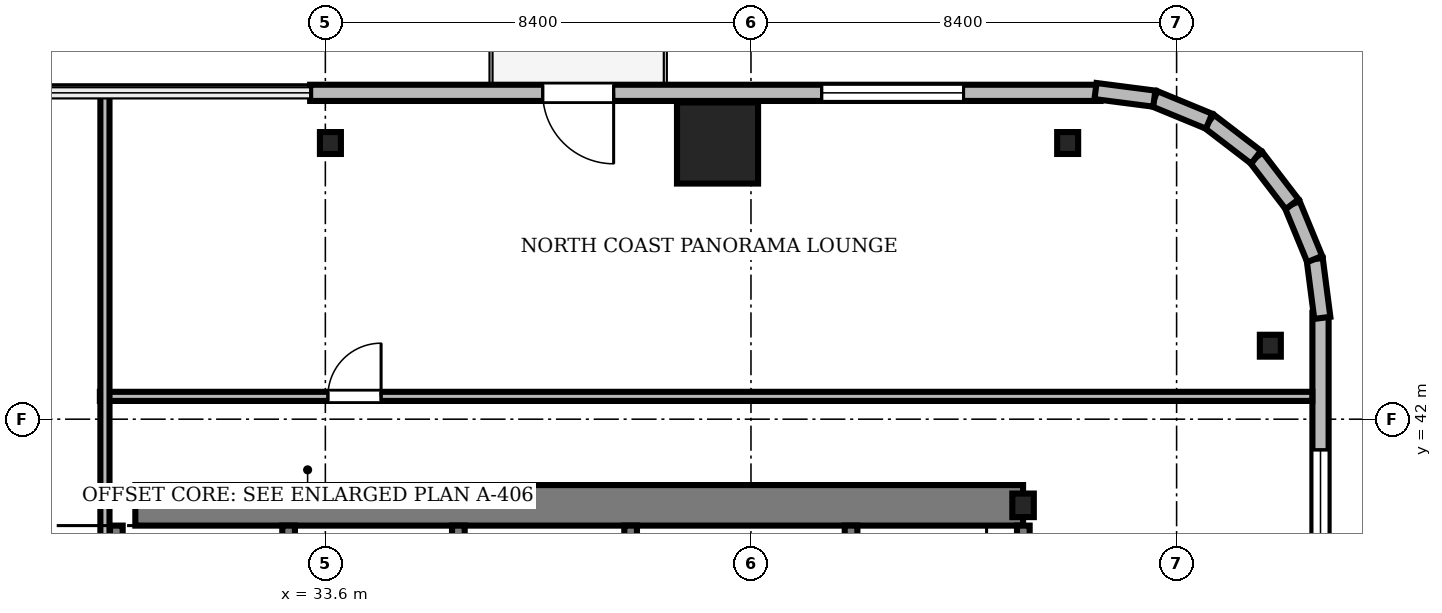
"""IFC4 building model, lengths in metres.
Left out: names, types, materials, properties, quantities, classifications, styles, units other than length and angle.
Written with IfcOpenShell. Run it as: python <this file> out.ifc"""

import sys

from ifc_helpers import new_model, si_unit, direction, frame, frame_2d, origin, origin_2d, place, context, subcontext, project, spatial, rectangle, i_section, extrude, source, transform, mapped, element, fill, save


model = new_model("IFC4")
c1 = context("Model", 3, precision=1e-05, world=origin(), true_north=direction((0.0, 1.0)))
c2 = subcontext(c1, "Body", "Model", "MODEL_VIEW")
j1 = project(units=[si_unit("LENGTHUNIT", "METRE"), si_unit("PLANEANGLEUNIT", "RADIAN")], contexts=[c1])
p1 = place(None, origin())
s1 = spatial("IfcSite", under=j1, at=p1, CompositionType="ELEMENT")
p2 = place(p1, origin())
s2 = spatial("IfcBuilding", under=s1, at=p2, CompositionType="ELEMENT")
p3 = place(p2, frame((0.0, 0.0, 133.5)))
s3 = spatial("IfcBuildingStorey", under=s2, at=p3, CompositionType="ELEMENT", Elevation=133.5)
m1 = source(origin(), c2, "Body", "SweptSolid", [
    extrude(rectangle(XDim=17.52, YDim=0.8, at=frame_2d((8.76, 0.0))), origin(), (0.0, 0.0, 1.0), 3.46),
])
p4 = place(p3, frame((29.85, 40.3, 0.0), z_axis=(0.0, 0.0, 1.0), x_axis=(1.0, 0.0, 0.0)))
e1 = element("IfcWall", 1, at=p4, inside=s3, PredefinedType="SHEAR", context=c2, shape_type="MappedRepresentation", body=[
    mapped(m1, transform((0.0, 0.0, 0.0), scale=1.0)),
])
m2 = source(origin(), c2, "Body", "SweptSolid", [
    extrude(i_section(OverallWidth=0.424, OverallDepth=0.465, WebThickness=0.035, FlangeThickness=0.056, FilletRadius=0.015, at=origin_2d()), origin(), (0.0, 0.0, 1.0), 3.46),
])
p5 = place(p3, frame((47.37, 40.3, 0.0), z_axis=(0.0, 0.0, 1.0), x_axis=(1.0, 0.0, 0.0)))
e2 = element("IfcColumn", 2, at=p5, inside=s3, PredefinedType="COLUMN", context=c2, shape_type="MappedRepresentation", body=[
    mapped(m2, transform((0.0, 0.0, 0.0), scale=1.0)),
])
m3 = source(origin(), c2, "Body", "SweptSolid", [
    extrude(rectangle(XDim=1.6, YDim=1.6, at=origin_2d()), origin(), (0.0, 0.0, 1.0), 3.46),
])
p6 = place(p3, frame((41.34, 47.45, 0.0), z_axis=(0.0, 0.0, 1.0), x_axis=(1.0, 0.0, 0.0)))
e3 = element("IfcColumn", 3, at=p6, inside=s3, PredefinedType="COLUMN", context=c2, shape_type="MappedRepresentation", body=[
    mapped(m3, transform((0.0, 0.0, 0.0), scale=1.0)),
])
m4 = source(origin(), c2, "Body", "SweptSolid", [
    extrude(i_section(OverallWidth=0.414, OverallDepth=0.432, WebThickness=0.026, FlangeThickness=0.04, FilletRadius=0.015, at=origin_2d()), origin(), (0.0, 0.0, 1.0), 3.46),
])
for number, where, z_axis, x_axis in (
    (4, (52.25, 43.45, 0.0), (0.0, 0.0, 1.0), (1.0, 0.0, 0.0)),
    (5, (48.25, 47.45, 0.0), (0.0, 0.0, 1.0), (1.0, 0.0, 0.0)),
    (6, (33.7, 47.45, 0.0), (0.0, 0.0, 1.0), (1.0, 0.0, 0.0)),
):
    element("IfcColumn", number, at=place(p3, frame(where, z_axis=z_axis, x_axis=x_axis)), inside=s3, PredefinedType="COLUMN", context=c2, shape_type="MappedRepresentation", body=[
        mapped(m4, transform((0.0, 0.0, 0.0), scale=1.0)),
    ])
m5 = source(origin(), c2, "Body", "SweptSolid", [
    extrude(rectangle(XDim=15.6, YDim=0.32, at=frame_2d((7.8, 0.0))), origin(), (0.0, 0.0, 1.0), 3.46),
])
p7 = place(p3, frame((48.9, 48.44, 0.0), z_axis=(0.0, 0.0, 1.0), x_axis=(-1.0, 0.0, 0.0)))
e7 = element("IfcWall", 7, at=p7, inside=s3, PredefinedType="SOLIDWALL", context=c2, shape_type="MappedRepresentation", body=[
    mapped(m5, transform((0.0, 0.0, 0.0), scale=1.0)),
])
m6 = source(origin(), c2, "Body", "SweptSolid", [
    extrude(rectangle(XDim=1.4, YDim=2.3, at=frame_2d((0.7, 1.15))), frame((0.0, 0.17, 0.0), z_axis=(0.0, -1.0, 0.0), x_axis=(1.0, 0.0, 0.0)), (0.0, 0.0, 1.0), 0.34),
])
p8 = place(p7, frame((9.61, 0.0, 0.0)))
e8 = element("IfcOpeningElement", 8, at=p8, cuts=e7, PredefinedType="OPENING", context=c2, shape_type="MappedRepresentation", body=[
    mapped(m6, transform((0.0, 0.0, 0.0), scale=1.0)),
])
m7 = source(origin(), c2, "Body", "SweptSolid", [
    extrude(rectangle(XDim=2.8, YDim=2.4, at=frame_2d((1.4, 1.2))), frame((0.0, 0.17, 0.0), z_axis=(0.0, -1.0, 0.0), x_axis=(1.0, 0.0, 0.0)), (0.0, 0.0, 1.0), 0.34),
])
p9 = place(p7, frame((2.705, 0.0, 0.72)))
e9 = element("IfcOpeningElement", 9, at=p9, cuts=e7, PredefinedType="OPENING", context=c2, shape_type="MappedRepresentation", body=[
    mapped(m7, transform((0.0, 0.0, 0.0), scale=1.0)),
])
m8 = source(origin(), c2, "Body", "SweptSolid", [
    extrude(rectangle(XDim=15.6, YDim=0.32, at=frame_2d((7.8, 0.0))), origin(), (0.0, 0.0, 1.0), 3.46),
])
p10 = place(p3, frame((53.24, 28.5, 0.0), z_axis=(0.0, 0.0, 1.0), x_axis=(0.0, 1.0, 0.0)))
e10 = element("IfcWall", 10, at=p10, inside=s3, PredefinedType="SOLIDWALL", context=c2, shape_type="MappedRepresentation", body=[
    mapped(m8, transform((0.0, 0.0, 0.0), scale=1.0)),
])
p11 = place(p10, frame((10.095, 0.0, 0.72)))
e11 = element("IfcOpeningElement", 11, at=p11, cuts=e10, PredefinedType="OPENING", context=c2, shape_type="MappedRepresentation", body=[
    mapped(m7, transform((0.0, 0.0, 0.0), scale=1.0)),
])
m9 = source(origin(), c2, "Body", "SweptSolid", [
    extrude(rectangle(XDim=1.17, YDim=0.32, at=frame_2d((0.585, 0.0))), origin(), (0.0, 0.0, 1.0), 3.46),
])
p12 = place(p3, frame((53.276, 44.0, 0.0), z_axis=(0.0, 0.0, 1.0), x_axis=(-0.128295670475, 0.991735963317, 0.0)))
e12 = element("IfcWall", 12, at=p12, inside=s3, PredefinedType="SOLIDWALL", context=c2, shape_type="MappedRepresentation", body=[
    mapped(m9, transform((0.0, 0.0, 0.0), scale=1.0)),
])
m10 = source(origin(), c2, "Body", "SweptSolid", [
    extrude(rectangle(XDim=1.169, YDim=0.32, at=frame_2d((0.584, 0.0))), origin(), (0.0, 0.0, 1.0), 3.46),
])
p13 = place(p3, frame((53.125, 45.16, 0.0), z_axis=(0.0, 0.0, 1.0), x_axis=(-0.381054331552, 0.924552646638, 0.0)))
e13 = element("IfcWall", 13, at=p13, inside=s3, PredefinedType="SOLIDWALL", context=c2, shape_type="MappedRepresentation", body=[
    mapped(m10, transform((0.0, 0.0, 0.0), scale=1.0)),
])
m11 = source(origin(), c2, "Body", "SweptSolid", [
    extrude(rectangle(XDim=1.169, YDim=0.32, at=frame_2d((0.584, 0.0))), origin(), (0.0, 0.0, 1.0), 3.46),
])
p14 = place(p3, frame((52.68, 46.241, 0.0), z_axis=(0.0, 0.0, 1.0), x_axis=(-0.608387696831, 0.793639975269, 0.0)))
e14 = element("IfcWall", 14, at=p14, inside=s3, PredefinedType="SOLIDWALL", context=c2, shape_type="MappedRepresentation", body=[
    mapped(m11, transform((0.0, 0.0, 0.0), scale=1.0)),
])
m12 = source(origin(), c2, "Body", "SweptSolid", [
    extrude(rectangle(XDim=1.169, YDim=0.32, at=frame_2d((0.584, 0.0))), origin(), (0.0, 0.0, 1.0), 3.46),
])
p15 = place(p3, frame((51.969, 47.169, 0.0), z_axis=(0.0, 0.0, 1.0), x_axis=(-0.793663520347, 0.608356981114, 0.0)))
e15 = element("IfcWall", 15, at=p15, inside=s3, PredefinedType="SOLIDWALL", context=c2, shape_type="MappedRepresentation", body=[
    mapped(m12, transform((0.0, 0.0, 0.0), scale=1.0)),
])
p16 = place(p3, frame((51.041, 47.88, 0.0), z_axis=(0.0, 0.0, 1.0), x_axis=(-0.924552646638, 0.381054331552, 0.0)))
e16 = element("IfcWall", 16, at=p16, inside=s3, PredefinedType="SOLIDWALL", context=c2, shape_type="MappedRepresentation", body=[
    mapped(m10, transform((0.0, 0.0, 0.0), scale=1.0)),
])
p17 = place(p3, frame((49.96, 48.325, 0.0), z_axis=(0.0, 0.0, 1.0), x_axis=(-0.991735963317, 0.128295670475, 0.0)))
e17 = element("IfcWall", 17, at=p17, inside=s3, PredefinedType="SOLIDWALL", context=c2, shape_type="MappedRepresentation", body=[
    mapped(m9, transform((0.0, 0.0, 0.0), scale=1.0)),
])
m13 = source(origin(), c2, "Body", "SweptSolid", [
    extrude(rectangle(XDim=9.25, YDim=0.25, at=frame_2d((4.625, 0.0))), origin(), (0.0, 0.0, 1.0), 3.5),
])
for number, where, z_axis, x_axis in (
    (18, (29.475, 30.65, 0.0), (0.0, 0.0, 1.0), (0.0, 1.0, 0.0)),
    (19, (32.875, 30.65, 0.0), (0.0, 0.0, 1.0), (0.0, 1.0, 0.0)),
    (20, (36.225, 30.65, 0.0), (0.0, 0.0, 1.0), (0.0, 1.0, 0.0)),
    (21, (39.625, 30.65, 0.0), (0.0, 0.0, 1.0), (0.0, 1.0, 0.0)),
    (22, (43.975, 30.65, 0.0), (0.0, 0.0, 1.0), (0.0, 1.0, 0.0)),
    (23, (47.375, 30.65, 0.0), (0.0, 0.0, 1.0), (0.0, 1.0, 0.0)),
):
    element("IfcWall", number, at=place(p3, frame(where, z_axis=z_axis, x_axis=x_axis)), inside=s3, PredefinedType="SOLIDWALL", context=c2, shape_type="MappedRepresentation", body=[
        mapped(m13, transform((0.0, 0.0, 0.0), scale=1.0)),
    ])
m14 = source(origin(), c2, "Body", "SweptSolid", [
    extrude(rectangle(XDim=23.928, YDim=0.18, at=frame_2d((11.964, 0.0))), origin(), (0.0, 0.0, 1.0), 2.702),
])
p18 = place(p3, frame((29.15, 42.45, 0.0), z_axis=(0.0, 0.0, 1.0), x_axis=(1.0, 0.0, 0.0)))
e24 = element("IfcWall", 24, at=p18, inside=s3, PredefinedType="PARTITIONING", context=c2, shape_type="MappedRepresentation", body=[
    mapped(m14, transform((0.0, 0.0, 0.0), scale=1.0)),
])
m15 = source(origin(), c2, "Body", "SweptSolid", [
    extrude(rectangle(XDim=1.05, YDim=2.2, at=frame_2d((0.525, 1.1))), frame((0.0, 0.1, 0.0), z_axis=(0.0, -1.0, 0.0), x_axis=(1.0, 0.0, 0.0)), (0.0, 0.0, 1.0), 0.2),
])
p19 = place(p18, frame((4.5, 0.0, 0.0)))
e25 = element("IfcOpeningElement", 25, at=p19, cuts=e24, PredefinedType="OPENING", context=c2, shape_type="MappedRepresentation", body=[
    mapped(m15, transform((0.0, 0.0, 0.0), scale=1.0)),
])
m16 = source(origin(), c2, "Body", "SweptSolid", [
    extrude(rectangle(XDim=11.45, YDim=0.18, at=frame_2d((5.725, 0.0))), origin(), (0.0, 0.0, 1.0), 2.702),
])
p20 = place(p3, frame((29.25, 37.02, 0.0), z_axis=(0.0, 0.0, 1.0), x_axis=(0.0, 1.0, 0.0)))
e26 = element("IfcWall", 26, at=p20, inside=s3, PredefinedType="PARTITIONING", context=c2, shape_type="MappedRepresentation", body=[
    mapped(m16, transform((0.0, 0.0, 0.0), scale=1.0)),
])
m17 = source(origin(), c2, "Body", "SweptSolid", [
    extrude(rectangle(XDim=1.4, YDim=2.3, at=frame_2d((0.7, 1.15))), frame((0.0, 0.025, 0.0), z_axis=(0.0, -1.0, 0.0), x_axis=(1.0, 0.0, 0.0)), (0.0, 0.0, 1.0), 0.05),
])
p21 = place(p8, frame((1.4, 0.0, 0.0), z_axis=(0.0, 0.0, 1.0), x_axis=(-1.0, 0.0, 0.0)))
e27 = element("IfcDoor", 27, at=p21, inside=s3, OperationType="DOUBLE_DOOR_SLIDING", PredefinedType="DOOR", context=c2, shape_type="MappedRepresentation", body=[
    mapped(m17, transform((0.0, 0.0, 0.0), scale=1.0)),
])
fill(e8, e27)
m18 = source(origin(), c2, "Body", "SweptSolid", [
    extrude(rectangle(XDim=2.8, YDim=2.4, at=frame_2d((1.4, 1.2))), frame((0.0, 0.03, 0.0), z_axis=(0.0, -1.0, 0.0), x_axis=(1.0, 0.0, 0.0)), (0.0, 0.0, 1.0), 0.06),
])
p22 = place(p9, origin())
e28 = element("IfcWindow", 28, at=p22, inside=s3, PartitioningType="SINGLE_PANEL", PredefinedType="WINDOW", context=c2, shape_type="MappedRepresentation", body=[
    mapped(m18, transform((0.0, 0.0, 0.0), scale=1.0)),
])
fill(e9, e28)
p23 = place(p11, origin())
e29 = element("IfcWindow", 29, at=p23, inside=s3, PartitioningType="SINGLE_PANEL", PredefinedType="WINDOW", context=c2, shape_type="MappedRepresentation", body=[
    mapped(m18, transform((0.0, 0.0, 0.0), scale=1.0)),
])
fill(e11, e29)
m19 = source(origin(), c2, "Body", "SweptSolid", [
    extrude(rectangle(XDim=1.05, YDim=2.2, at=frame_2d((0.525, 1.1))), frame((0.0, 0.025, 0.0), z_axis=(0.0, -1.0, 0.0), x_axis=(1.0, 0.0, 0.0)), (0.0, 0.0, 1.0), 0.05),
])
p24 = place(p19, origin())
e30 = element("IfcDoor", 30, at=p24, inside=s3, OperationType="SINGLE_SWING_RIGHT", PredefinedType="DOOR", context=c2, shape_type="MappedRepresentation", body=[
    mapped(m19, transform((0.0, 0.0, 0.0), scale=1.0)),
])
fill(e25, e30)
save(model, sys.argv[1])
